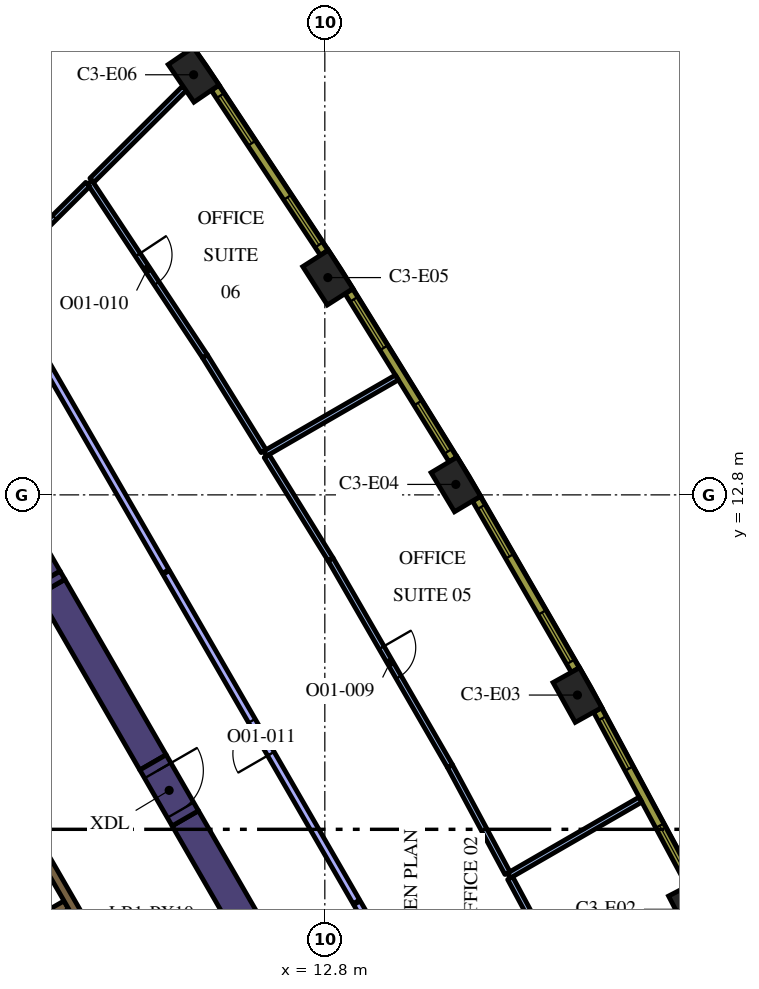
"""IFC4 building model, lengths in metres.
Left out: names, types, materials, properties, quantities, classifications, styles, units other than length and angle.
Written with IfcOpenShell. Run it as: python <this file> out.ifc"""

import sys

from ifc_helpers import new_model, si_unit, direction, frame, frame_2d, origin, origin_2d, place, context, subcontext, project, spatial, polyline, rectangle, outline, extrude, element, fill, save


model = new_model("IFC4")
c1 = context("Model", 3, precision=1e-05, world=origin(), true_north=direction((0.0, 1.0)))
c2 = subcontext(c1, "Body", "Model", "MODEL_VIEW")
j1 = project(units=[si_unit("LENGTHUNIT", "METRE"), si_unit("PLANEANGLEUNIT", "RADIAN")], contexts=[c1])
p1 = place(None, origin())
s1 = spatial("IfcSite", under=j1, at=p1, CompositionType="ELEMENT")
p2 = place(p1, origin())
s2 = spatial("IfcBuilding", under=s1, at=p2, CompositionType="ELEMENT")
p3 = place(p2, frame((0.0, 0.0, 145.8)))
s3 = spatial("IfcBuildingStorey", under=s2, at=p3, CompositionType="ELEMENT", Elevation=145.8)
for number, where, z_axis, x_axis in (
    (1, (22.476, 1.896, 0.0), (0.0, 0.0, 1.0), (-0.46, 0.888, 0.0)),
    (2, (19.447, 7.533, 0.0), (0.0, 0.0, 1.0), (-0.487, 0.874, 0.0)),
    (3, (16.247, 13.075, 0.0), (0.0, 0.0, 1.0), (-0.513, 0.858, 0.0)),
    (4, (12.88, 18.517, 0.0), (0.0, 0.0, 1.0), (-0.539, 0.842, 0.0)),
    (5, (9.348, 23.854, 0.0), (0.0, 0.0, 1.0), (-0.565, 0.825, 0.0)),
):
    element("IfcColumn", number, at=place(p3, frame(where, z_axis=z_axis, x_axis=x_axis)), inside=s3, PredefinedType="COLUMN", context=c2, shape_type="SweptSolid", body=[
        extrude(rectangle(XDim=1.2, YDim=0.8, at=origin_2d()), origin(), (0.0, 0.0, 1.0), 4.2),
    ])
p4 = place(p3, frame((9.129, 4.289, 0.0), z_axis=(0.0, 0.0, 1.0), x_axis=(0.499995742806, -0.866027861663, 0.0)))
e6 = element("IfcWall", 6, at=p4, inside=s3, PredefinedType="SOLIDWALL", context=c2, shape_type="SweptSolid", body=[
    extrude(rectangle(XDim=12.527, YDim=0.8, at=frame_2d((6.264, 0.0))), origin(), (0.0, 0.0, 1.0), 4.2),
])
p5 = place(p3, frame((5.489, 10.594, 0.0), z_axis=(0.0, 0.0, 1.0), x_axis=(-0.500000383388, 0.866025182435, 0.0)))
e7 = element("IfcWall", 7, at=p5, inside=s3, PredefinedType="SOLIDWALL", context=c2, shape_type="SweptSolid", body=[
    extrude(rectangle(XDim=0.558, YDim=0.8, at=frame_2d((0.279, 0.0))), origin(), (0.0, 0.0, 1.0), 4.2),
])
p6 = place(p3, frame((5.615, 10.375, 0.0), z_axis=(0.0, 0.0, 1.0), x_axis=(0.500002746266, -0.866023818221, 0.0)))
e8 = element("IfcWall", 8, at=p6, inside=s3, PredefinedType="SOLIDWALL", context=c2, shape_type="SweptSolid", body=[
    extrude(rectangle(XDim=5.328, YDim=0.8, at=frame_2d((2.664, 0.0))), origin(), (0.0, 0.0, 1.0), 4.2),
])
p7 = place(p3, origin())
e9 = element("IfcWall", 9, at=p7, inside=s3, PredefinedType="SOLIDWALL", context=c2, shape_type="SweptSolid", body=[
    extrude(outline(polyline([(5.432, 10.272), (5.308, 10.487), (5.836, 10.792), (5.96, 10.577), (5.432, 10.272)])), origin(), (0.0, 0.0, 1.0), 4.2),
])
p8 = place(p3, frame((5.97, -2.591, 0.0), z_axis=(0.0, 0.0, 1.0), x_axis=(-0.499994469932, 0.866028596547, 0.0)))
e10 = element("IfcWall", 10, at=p8, inside=s3, PredefinedType="SOLIDWALL", context=c2, shape_type="SweptSolid", body=[
    extrude(rectangle(XDim=10.488, YDim=0.25, at=frame_2d((5.244, 0.0))), origin(), (0.0, 0.0, 1.0), 4.2),
])
p9 = place(p3, frame((4.094, 0.909, 0.0), z_axis=(0.0, 0.0, 1.0), x_axis=(0.866008176907, 0.50002983664, 0.0)))
e11 = element("IfcWall", 11, at=p9, inside=s3, PredefinedType="SOLIDWALL", context=c2, shape_type="SweptSolid", body=[
    extrude(rectangle(XDim=2.2, YDim=0.25, at=frame_2d((1.1, 0.0))), origin(), (0.0, 0.0, 1.0), 4.2),
])
p10 = place(p3, frame((8.565, -2.185, 0.0), z_axis=(0.0, 0.0, 1.0), x_axis=(-0.499997954832, 0.866026584559, 0.0)))
e12 = element("IfcWall", 12, at=p10, inside=s3, PredefinedType="SOLIDWALL", context=c2, shape_type="SweptSolid", body=[
    extrude(rectangle(XDim=12.35, YDim=0.25, at=frame_2d((6.175, 0.0))), origin(), (0.0, 0.0, 1.0), 4.2),
])
p11 = place(p10, frame((0.585, 0.0, 0.0)))
e13 = element("IfcOpeningElement", 13, at=p11, cuts=e12, PredefinedType="OPENING", context=c2, shape_type="SweptSolid", body=[
    extrude(rectangle(XDim=1.1, YDim=2.1, at=frame_2d((0.55, 1.05))), frame((0.0, 0.135, 0.0), z_axis=(0.0, -1.0, 0.0), x_axis=(1.0, 0.0, 0.0)), (0.0, 0.0, 1.0), 0.27),
])
p12 = place(p3, frame((8.279, 5.761, 0.0), z_axis=(0.0, 0.0, 1.0), x_axis=(0.500062241894, -0.865989465428, 0.0)))
e14 = element("IfcWall", 14, at=p12, inside=s3, PredefinedType="SOLIDWALL", context=c2, shape_type="SweptSolid", body=[
    extrude(rectangle(XDim=1.7, YDim=0.8, at=frame_2d((0.85, 0.0))), origin(), (0.0, 0.0, 1.0), 4.2),
])
p13 = place(p12, frame((0.25, 0.0, 0.0)))
e15 = element("IfcOpeningElement", 15, at=p13, cuts=e14, PredefinedType="OPENING", context=c2, shape_type="SweptSolid", body=[
    extrude(rectangle(XDim=1.2, YDim=2.1, at=frame_2d((0.6, 1.05))), frame((0.0, 0.41, 0.0), z_axis=(0.0, -1.0, 0.0), x_axis=(1.0, 0.0, 0.0)), (0.0, 0.0, 1.0), 0.82),
])
p14 = place(p3, frame((17.641, 2.781, 0.0), z_axis=(0.0, 0.0, 1.0), x_axis=(0.866053520969, 0.499951296445, 0.0)))
e16 = element("IfcWall", 16, at=p14, inside=s3, PredefinedType="PARTITIONING", context=c2, shape_type="SweptSolid", body=[
    extrude(rectangle(XDim=4.002, YDim=0.15, at=frame_2d((2.001, 0.0))), origin(), (0.0, 0.0, 1.0), 3.15),
])
p15 = place(p3, frame((19.066, 0.129, 0.0), z_axis=(0.0, 0.0, 1.0), x_axis=(-0.473335829303, 0.880882053795, 0.0)))
e17 = element("IfcWall", 17, at=p15, inside=s3, PredefinedType="PARTITIONING", context=c2, shape_type="SweptSolid", body=[
    extrude(rectangle(XDim=2.935, YDim=0.15, at=frame_2d((1.468, 0.0))), origin(), (0.0, 0.0, 1.0), 3.15),
])
p16 = place(p3, frame((11.229, 13.887, 0.0), z_axis=(0.0, 0.0, 1.0), x_axis=(0.866038271014, 0.499977712642, 0.0)))
e18 = element("IfcWall", 18, at=p16, inside=s3, PredefinedType="PARTITIONING", context=c2, shape_type="SweptSolid", body=[
    extrude(rectangle(XDim=4.002, YDim=0.15, at=frame_2d((2.001, 0.0))), origin(), (0.0, 0.0, 1.0), 3.15),
])
p17 = place(p3, frame((17.606, 2.847, 0.0), z_axis=(0.0, 0.0, 1.0), x_axis=(-0.473348321673, 0.880875340993, 0.0)))
e19 = element("IfcWall", 19, at=p17, inside=s3, PredefinedType="PARTITIONING", context=c2, shape_type="SweptSolid", body=[
    extrude(rectangle(XDim=3.197, YDim=0.15, at=frame_2d((1.599, 0.0))), origin(), (0.0, 0.0, 1.0), 3.15),
])
p18 = place(p3, frame((12.951, 11.104, 0.0), z_axis=(0.0, 0.0, 1.0), x_axis=(0.499992691614, -0.866029623242, 0.0)))
e20 = element("IfcWall", 20, at=p18, inside=s3, PredefinedType="PARTITIONING", context=c2, shape_type="SweptSolid", body=[
    extrude(rectangle(XDim=6.282, YDim=0.15, at=frame_2d((3.141, 0.0))), origin(), (0.0, 0.0, 1.0), 3.15),
])
p19 = place(p18, frame((2.683, 0.0, 0.0)))
e21 = element("IfcOpeningElement", 21, at=p19, cuts=e20, PredefinedType="OPENING", context=c2, shape_type="SweptSolid", body=[
    extrude(rectangle(XDim=0.9, YDim=2.1, at=frame_2d((0.45, 1.05))), frame((0.0, 0.085, 0.0), z_axis=(0.0, -1.0, 0.0), x_axis=(1.0, 0.0, 0.0)), (0.0, 0.0, 1.0), 0.17),
])
p20 = place(p3, frame((12.951, 11.104, 0.0), z_axis=(0.0, 0.0, 1.0), x_axis=(-0.526204763311, 0.850357893518, 0.0)))
e22 = element("IfcWall", 22, at=p20, inside=s3, PredefinedType="PARTITIONING", context=c2, shape_type="SweptSolid", body=[
    extrude(rectangle(XDim=3.197, YDim=0.15, at=frame_2d((1.599, 0.0))), origin(), (0.0, 0.0, 1.0), 3.15),
])
p21 = place(p3, frame((11.19, 13.951, 0.0), z_axis=(0.0, 0.0, 1.0), x_axis=(-0.526165616903, 0.850382116221, 0.0)))
e23 = element("IfcWall", 23, at=p21, inside=s3, PredefinedType="PARTITIONING", context=c2, shape_type="SweptSolid", body=[
    extrude(rectangle(XDim=2.935, YDim=0.15, at=frame_2d((1.468, 0.0))), origin(), (0.0, 0.0, 1.0), 3.15),
])
p22 = place(p3, frame((6.616, 21.024, 0.0), z_axis=(0.0, 0.0, 1.0), x_axis=(0.551915124006, -0.833900291338, 0.0)))
e24 = element("IfcWall", 24, at=p22, inside=s3, PredefinedType="PARTITIONING", context=c2, shape_type="SweptSolid", body=[
    extrude(rectangle(XDim=5.488, YDim=0.15, at=frame_2d((2.744, 0.0))), origin(), (0.0, 0.0, 1.0), 3.15),
])
p23 = place(p22, frame((2.288, 0.0, 0.0)))
e25 = element("IfcOpeningElement", 25, at=p23, cuts=e24, PredefinedType="OPENING", context=c2, shape_type="SweptSolid", body=[
    extrude(rectangle(XDim=0.9, YDim=2.1, at=frame_2d((0.45, 1.05))), frame((0.0, 0.085, 0.0), z_axis=(0.0, -1.0, 0.0), x_axis=(1.0, 0.0, 0.0)), (0.0, 0.0, 1.0), 0.17),
])
p24 = place(p3, frame((6.67, 21.078, 0.0), z_axis=(0.0, 0.0, 1.0), x_axis=(0.709236178776, 0.704970951681, 0.0)))
e26 = element("IfcWall", 26, at=p24, inside=s3, PredefinedType="PARTITIONING", context=c2, shape_type="SweptSolid", body=[
    extrude(rectangle(XDim=3.434, YDim=0.15, at=frame_2d((1.717, 0.0))), origin(), (0.0, 0.0, 1.0), 3.15),
])
p25 = place(p3, frame((4.128, 18.55, 0.0), z_axis=(0.0, 0.0, 1.0), x_axis=(0.709237676072, 0.704969445324, 0.0)))
e27 = element("IfcWall", 27, at=p25, inside=s3, PredefinedType="PARTITIONING", context=c2, shape_type="SweptSolid", body=[
    extrude(rectangle(XDim=3.432, YDim=0.15, at=frame_2d((1.716, 0.0))), origin(), (0.0, 0.0, 1.0), 3.15),
])
p26 = place(p25, frame((1.3, 0.0, 0.0)))
e28 = element("IfcOpeningElement", 28, at=p26, cuts=e27, PredefinedType="OPENING", context=c2, shape_type="SweptSolid", body=[
    extrude(rectangle(XDim=0.9, YDim=2.1, at=frame_2d((0.45, 1.05))), frame((0.0, 0.085, 0.0), z_axis=(0.0, -1.0, 0.0), x_axis=(1.0, 0.0, 0.0)), (0.0, 0.0, 1.0), 0.17),
])
p27 = place(p3, frame((13.63, 2.091, 0.0), z_axis=(0.0, 0.0, 1.0), x_axis=(-0.499990634175, 0.866030811078, 0.0)))
e29 = element("IfcWall", 29, at=p27, inside=s3, PredefinedType="PARTITIONING", context=c2, shape_type="SweptSolid", body=[
    extrude(rectangle(XDim=10.008, YDim=0.2, at=frame_2d((5.004, 0.0))), origin(), (0.0, 0.0, 1.0), 3.15),
])
p28 = place(p27, frame((4.5, 0.0, 0.0)))
e30 = element("IfcOpeningElement", 30, at=p28, cuts=e29, PredefinedType="OPENING", context=c2, shape_type="SweptSolid", body=[
    extrude(rectangle(XDim=1.0, YDim=2.1, at=frame_2d((0.5, 1.05))), frame((0.0, 0.11, 0.0), z_axis=(0.0, -1.0, 0.0), x_axis=(1.0, 0.0, 0.0)), (0.0, 0.0, 1.0), 0.22),
])
p29 = place(p3, frame((8.611, 10.785, 0.0), z_axis=(0.0, 0.0, 1.0), x_axis=(-0.499987928593, 0.866032373102, 0.0)))
e31 = element("IfcWall", 31, at=p29, inside=s3, PredefinedType="PARTITIONING", context=c2, shape_type="SweptSolid", body=[
    extrude(rectangle(XDim=8.889, YDim=0.2, at=frame_2d((4.445, 0.0))), origin(), (0.0, 0.0, 1.0), 3.15),
])
p30 = place(p3, frame((18.504, -6.35, 0.0), z_axis=(0.0, 0.0, 1.0), x_axis=(-0.499995029582, 0.866028273438, 0.0)))
e32 = element("IfcWall", 32, at=p30, inside=s3, PredefinedType="PARTITIONING", context=c2, shape_type="SweptSolid", body=[
    extrude(rectangle(XDim=9.717, YDim=0.2, at=frame_2d((4.859, 0.0))), origin(), (0.0, 0.0, 1.0), 3.15),
])
p31 = place(p3, frame((22.44, 2.555, 0.0), z_axis=(0.0, 0.0, 1.0), x_axis=(-0.473349833294, 0.880874528704, 0.0)))
e33 = element("IfcWall", 33, at=p31, inside=s3, PredefinedType="SOLIDWALL", context=c2, shape_type="SweptSolid", body=[
    extrude(rectangle(XDim=5.204, YDim=0.24, at=frame_2d((2.602, 0.0))), origin(), (0.0, 0.0, 1.0), 3.95),
])
p32 = place(p31, frame((0.248, 0.0, 0.9)))
e34 = element("IfcOpeningElement", 34, at=p32, cuts=e33, PredefinedType="OPENING", context=c2, shape_type="SweptSolid", body=[
    extrude(rectangle(XDim=1.5, YDim=2.55, at=frame_2d((0.75, 1.275))), frame((0.0, 0.13, 0.0), z_axis=(0.0, -1.0, 0.0), x_axis=(1.0, 0.0, 0.0)), (0.0, 0.0, 1.0), 0.26),
])
p33 = place(p31, frame((3.455, 0.0, 0.9)))
e35 = element("IfcOpeningElement", 35, at=p33, cuts=e33, PredefinedType="OPENING", context=c2, shape_type="SweptSolid", body=[
    extrude(rectangle(XDim=1.5, YDim=2.55, at=frame_2d((0.75, 1.275))), frame((0.0, 0.13, 0.0), z_axis=(0.0, -1.0, 0.0), x_axis=(1.0, 0.0, 0.0)), (0.0, 0.0, 1.0), 0.26),
])
p34 = place(p3, frame((19.391, 8.191, 0.0), z_axis=(0.0, 0.0, 1.0), x_axis=(-0.500009456303, 0.866019944116, 0.0)))
e36 = element("IfcWall", 36, at=p34, inside=s3, PredefinedType="SOLIDWALL", context=c2, shape_type="SweptSolid", body=[
    extrude(rectangle(XDim=5.204, YDim=0.24, at=frame_2d((2.602, 0.0))), origin(), (0.0, 0.0, 1.0), 3.95),
])
p35 = place(p34, frame((0.248, 0.0, 0.9)))
e37 = element("IfcOpeningElement", 37, at=p35, cuts=e36, PredefinedType="OPENING", context=c2, shape_type="SweptSolid", body=[
    extrude(rectangle(XDim=1.5, YDim=2.55, at=frame_2d((0.75, 1.275))), frame((0.0, 0.13, 0.0), z_axis=(0.0, -1.0, 0.0), x_axis=(1.0, 0.0, 0.0)), (0.0, 0.0, 1.0), 0.26),
])
p36 = place(p34, frame((3.455, 0.0, 0.9)))
e38 = element("IfcOpeningElement", 38, at=p36, cuts=e36, PredefinedType="OPENING", context=c2, shape_type="SweptSolid", body=[
    extrude(rectangle(XDim=1.5, YDim=2.55, at=frame_2d((0.75, 1.275))), frame((0.0, 0.13, 0.0), z_axis=(0.0, -1.0, 0.0), x_axis=(1.0, 0.0, 0.0)), (0.0, 0.0, 1.0), 0.26),
])
p37 = place(p3, frame((16.171, 13.731, 0.0), z_axis=(0.0, 0.0, 1.0), x_axis=(-0.526197926587, 0.850362124072, 0.0)))
e39 = element("IfcWall", 39, at=p37, inside=s3, PredefinedType="SOLIDWALL", context=c2, shape_type="SweptSolid", body=[
    extrude(rectangle(XDim=5.203, YDim=0.24, at=frame_2d((2.602, 0.0))), origin(), (0.0, 0.0, 1.0), 3.95),
])
p38 = place(p37, frame((0.248, 0.0, 0.9)))
e40 = element("IfcOpeningElement", 40, at=p38, cuts=e39, PredefinedType="OPENING", context=c2, shape_type="SweptSolid", body=[
    extrude(rectangle(XDim=1.5, YDim=2.55, at=frame_2d((0.75, 1.275))), frame((0.0, 0.13, 0.0), z_axis=(0.0, -1.0, 0.0), x_axis=(1.0, 0.0, 0.0)), (0.0, 0.0, 1.0), 0.26),
])
p39 = place(p37, frame((3.455, 0.0, 0.9)))
e41 = element("IfcOpeningElement", 41, at=p39, cuts=e39, PredefinedType="OPENING", context=c2, shape_type="SweptSolid", body=[
    extrude(rectangle(XDim=1.5, YDim=2.55, at=frame_2d((0.75, 1.275))), frame((0.0, 0.13, 0.0), z_axis=(0.0, -1.0, 0.0), x_axis=(1.0, 0.0, 0.0)), (0.0, 0.0, 1.0), 0.26),
])
p40 = place(p3, frame((12.783, 19.171, 0.0), z_axis=(0.0, 0.0, 1.0), x_axis=(-0.551892811511, 0.833915058386, 0.0)))
e42 = element("IfcWall", 42, at=p40, inside=s3, PredefinedType="SOLIDWALL", context=c2, shape_type="SweptSolid", body=[
    extrude(rectangle(XDim=5.204, YDim=0.24, at=frame_2d((2.602, 0.0))), origin(), (0.0, 0.0, 1.0), 3.95),
])
p41 = place(p40, frame((0.248, 0.0, 0.9)))
e43 = element("IfcOpeningElement", 43, at=p41, cuts=e42, PredefinedType="OPENING", context=c2, shape_type="SweptSolid", body=[
    extrude(rectangle(XDim=1.5, YDim=2.55, at=frame_2d((0.75, 1.275))), frame((0.0, 0.13, 0.0), z_axis=(0.0, -1.0, 0.0), x_axis=(1.0, 0.0, 0.0)), (0.0, 0.0, 1.0), 0.26),
])
p42 = place(p40, frame((3.455, 0.0, 0.9)))
e44 = element("IfcOpeningElement", 44, at=p42, cuts=e42, PredefinedType="OPENING", context=c2, shape_type="SweptSolid", body=[
    extrude(rectangle(XDim=1.5, YDim=2.55, at=frame_2d((0.75, 1.275))), frame((0.0, 0.13, 0.0), z_axis=(0.0, -1.0, 0.0), x_axis=(1.0, 0.0, 0.0)), (0.0, 0.0, 1.0), 0.26),
])
p43 = place(p3, frame((9.231, 24.504, 0.0), z_axis=(0.0, 0.0, 1.0), x_axis=(-0.577115207679, 0.816662743772, 0.0)))
e45 = element("IfcWall", 45, at=p43, inside=s3, PredefinedType="SOLIDWALL", context=c2, shape_type="SweptSolid", body=[
    extrude(rectangle(XDim=5.213, YDim=0.24, at=frame_2d((2.606, 0.0))), origin(), (0.0, 0.0, 1.0), 3.95),
])
p44 = place(p43, frame((0.261, 0.0, 0.9)))
e46 = element("IfcOpeningElement", 46, at=p44, cuts=e45, PredefinedType="OPENING", context=c2, shape_type="SweptSolid", body=[
    extrude(rectangle(XDim=1.5, YDim=2.55, at=frame_2d((0.75, 1.275))), frame((0.0, 0.13, 0.0), z_axis=(0.0, -1.0, 0.0), x_axis=(1.0, 0.0, 0.0)), (0.0, 0.0, 1.0), 0.26),
])
p45 = place(p43, frame((3.492, 0.0, 0.9)))
e47 = element("IfcOpeningElement", 47, at=p45, cuts=e45, PredefinedType="OPENING", context=c2, shape_type="SweptSolid", body=[
    extrude(rectangle(XDim=1.5, YDim=2.55, at=frame_2d((0.75, 1.275))), frame((0.0, 0.13, 0.0), z_axis=(0.0, -1.0, 0.0), x_axis=(1.0, 0.0, 0.0)), (0.0, 0.0, 1.0), 0.26),
])
p46 = place(p13, origin())
e48 = element("IfcDoor", 48, at=p46, inside=s3, OperationType="SINGLE_SWING_LEFT", PredefinedType="DOOR", context=c2, shape_type="SweptSolid", body=[
    extrude(rectangle(XDim=1.2, YDim=2.1, at=frame_2d((0.6, 1.05))), frame((0.0, 0.025, 0.0), z_axis=(0.0, -1.0, 0.0), x_axis=(1.0, 0.0, 0.0)), (0.0, 0.0, 1.0), 0.05),
])
fill(e15, e48)
p47 = place(p19, origin())
e49 = element("IfcDoor", 49, at=p47, inside=s3, OperationType="SINGLE_SWING_LEFT", PredefinedType="DOOR", context=c2, shape_type="SweptSolid", body=[
    extrude(rectangle(XDim=0.9, YDim=2.1, at=frame_2d((0.45, 1.05))), frame((0.0, 0.025, 0.0), z_axis=(0.0, -1.0, 0.0), x_axis=(1.0, 0.0, 0.0)), (0.0, 0.0, 1.0), 0.05),
])
fill(e21, e49)
p48 = place(p23, origin())
e50 = element("IfcDoor", 50, at=p48, inside=s3, OperationType="SINGLE_SWING_LEFT", PredefinedType="DOOR", context=c2, shape_type="SweptSolid", body=[
    extrude(rectangle(XDim=0.9, YDim=2.1, at=frame_2d((0.45, 1.05))), frame((0.0, 0.025, 0.0), z_axis=(0.0, -1.0, 0.0), x_axis=(1.0, 0.0, 0.0)), (0.0, 0.0, 1.0), 0.05),
])
fill(e25, e50)
p49 = place(p28, origin())
e51 = element("IfcDoor", 51, at=p49, inside=s3, OperationType="SINGLE_SWING_LEFT", PredefinedType="DOOR", context=c2, shape_type="SweptSolid", body=[
    extrude(rectangle(XDim=1.0, YDim=2.1, at=frame_2d((0.5, 1.05))), frame((0.0, 0.025, 0.0), z_axis=(0.0, -1.0, 0.0), x_axis=(1.0, 0.0, 0.0)), (0.0, 0.0, 1.0), 0.05),
])
fill(e30, e51)
p50 = place(p26, origin())
e52 = element("IfcDoor", 52, at=p50, inside=s3, OperationType="SINGLE_SWING_RIGHT", PredefinedType="DOOR", context=c2, shape_type="SweptSolid", body=[
    extrude(rectangle(XDim=0.9, YDim=2.1, at=frame_2d((0.45, 1.05))), frame((0.0, 0.025, 0.0), z_axis=(0.0, -1.0, 0.0), x_axis=(1.0, 0.0, 0.0)), (0.0, 0.0, 1.0), 0.05),
])
fill(e28, e52)
p51 = place(p32, origin())
e53 = element("IfcWindow", 53, at=p51, inside=s3, PartitioningType="SINGLE_PANEL", PredefinedType="WINDOW", context=c2, shape_type="SweptSolid", body=[
    extrude(rectangle(XDim=1.5, YDim=2.55, at=frame_2d((0.75, 1.275))), frame((0.0, 0.04, 0.0), z_axis=(0.0, -1.0, 0.0), x_axis=(1.0, 0.0, 0.0)), (0.0, 0.0, 1.0), 0.06),
])
fill(e34, e53)
p52 = place(p33, origin())
e54 = element("IfcWindow", 54, at=p52, inside=s3, PartitioningType="SINGLE_PANEL", PredefinedType="WINDOW", context=c2, shape_type="SweptSolid", body=[
    extrude(rectangle(XDim=1.5, YDim=2.55, at=frame_2d((0.75, 1.275))), frame((0.0, 0.04, 0.0), z_axis=(0.0, -1.0, 0.0), x_axis=(1.0, 0.0, 0.0)), (0.0, 0.0, 1.0), 0.06),
])
fill(e35, e54)
p53 = place(p35, origin())
e55 = element("IfcWindow", 55, at=p53, inside=s3, PartitioningType="SINGLE_PANEL", PredefinedType="WINDOW", context=c2, shape_type="SweptSolid", body=[
    extrude(rectangle(XDim=1.5, YDim=2.55, at=frame_2d((0.75, 1.275))), frame((0.0, 0.04, 0.0), z_axis=(0.0, -1.0, 0.0), x_axis=(1.0, 0.0, 0.0)), (0.0, 0.0, 1.0), 0.06),
])
fill(e37, e55)
p54 = place(p36, origin())
e56 = element("IfcWindow", 56, at=p54, inside=s3, PartitioningType="SINGLE_PANEL", PredefinedType="WINDOW", context=c2, shape_type="SweptSolid", body=[
    extrude(rectangle(XDim=1.5, YDim=2.55, at=frame_2d((0.75, 1.275))), frame((0.0, 0.04, 0.0), z_axis=(0.0, -1.0, 0.0), x_axis=(1.0, 0.0, 0.0)), (0.0, 0.0, 1.0), 0.06),
])
fill(e38, e56)
p55 = place(p38, origin())
e57 = element("IfcWindow", 57, at=p55, inside=s3, PartitioningType="SINGLE_PANEL", PredefinedType="WINDOW", context=c2, shape_type="SweptSolid", body=[
    extrude(rectangle(XDim=1.5, YDim=2.55, at=frame_2d((0.75, 1.275))), frame((0.0, 0.04, 0.0), z_axis=(0.0, -1.0, 0.0), x_axis=(1.0, 0.0, 0.0)), (0.0, 0.0, 1.0), 0.06),
])
fill(e40, e57)
p56 = place(p39, origin())
e58 = element("IfcWindow", 58, at=p56, inside=s3, PartitioningType="SINGLE_PANEL", PredefinedType="WINDOW", context=c2, shape_type="SweptSolid", body=[
    extrude(rectangle(XDim=1.5, YDim=2.55, at=frame_2d((0.75, 1.275))), frame((0.0, 0.04, 0.0), z_axis=(0.0, -1.0, 0.0), x_axis=(1.0, 0.0, 0.0)), (0.0, 0.0, 1.0), 0.06),
])
fill(e41, e58)
p57 = place(p41, origin())
e59 = element("IfcWindow", 59, at=p57, inside=s3, PartitioningType="SINGLE_PANEL", PredefinedType="WINDOW", context=c2, shape_type="SweptSolid", body=[
    extrude(rectangle(XDim=1.5, YDim=2.55, at=frame_2d((0.75, 1.275))), frame((0.0, 0.04, 0.0), z_axis=(0.0, -1.0, 0.0), x_axis=(1.0, 0.0, 0.0)), (0.0, 0.0, 1.0), 0.06),
])
fill(e43, e59)
p58 = place(p42, origin())
e60 = element("IfcWindow", 60, at=p58, inside=s3, PartitioningType="SINGLE_PANEL", PredefinedType="WINDOW", context=c2, shape_type="SweptSolid", body=[
    extrude(rectangle(XDim=1.5, YDim=2.55, at=frame_2d((0.75, 1.275))), frame((0.0, 0.04, 0.0), z_axis=(0.0, -1.0, 0.0), x_axis=(1.0, 0.0, 0.0)), (0.0, 0.0, 1.0), 0.06),
])
fill(e44, e60)
save(model, sys.argv[1])
